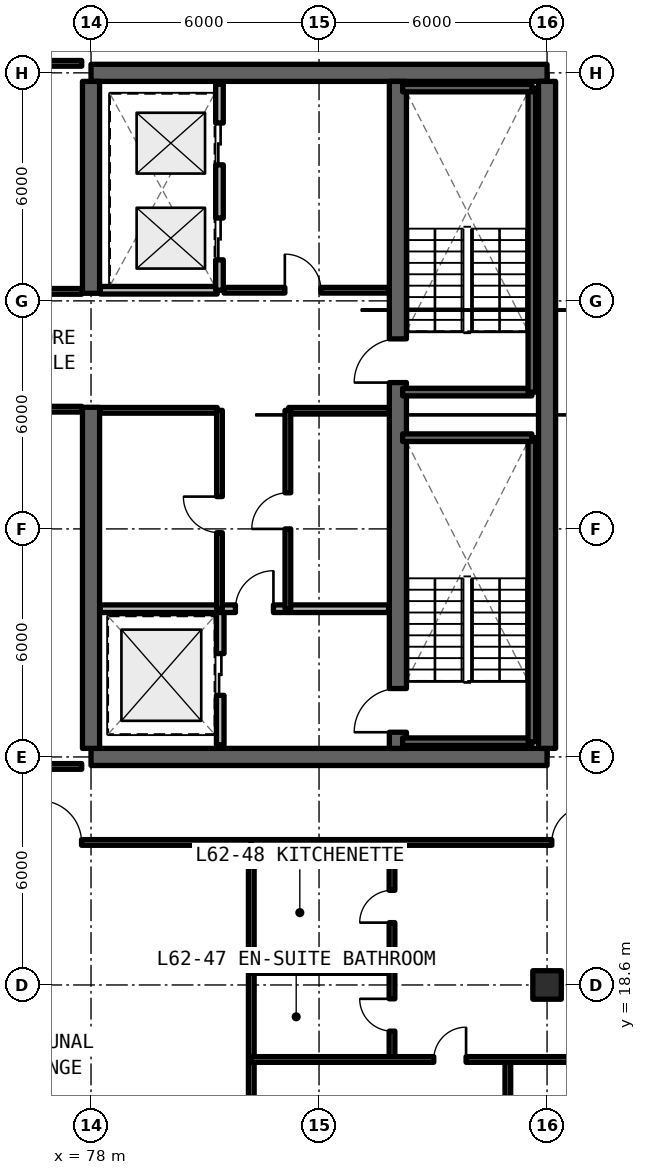
"""IFC4 building model, lengths in metres.
Left out: names, types, materials, properties, quantities, classifications, styles, units other than length and angle.
Written with IfcOpenShell. Run it as: python <this file> out.ifc"""

import sys

from ifc_helpers import new_model, si_unit, direction, frame, frame_2d, origin, origin_2d, place, context, subcontext, project, spatial, rectangle, extrude, element, fill, save


model = new_model("IFC4")
c1 = context("Model", 3, precision=1e-05, world=origin(), true_north=direction((0.0, 1.0)))
c2 = subcontext(c1, "Body", "Model", "MODEL_VIEW")
j1 = project(units=[si_unit("LENGTHUNIT", "METRE"), si_unit("PLANEANGLEUNIT", "RADIAN")], contexts=[c1])
p1 = place(None, origin())
s1 = spatial("IfcSite", under=j1, at=p1, CompositionType="ELEMENT")
p2 = place(p1, origin())
s2 = spatial("IfcBuilding", under=s1, at=p2, CompositionType="ELEMENT")
p3 = place(p2, frame((0.0, 0.0, 222.75)))
s3 = spatial("IfcBuildingStorey", under=s2, at=p3, CompositionType="ELEMENT", Elevation=222.75)
for number, where, z_axis, x_axis in (
    (1, (78.0, 24.6, 0.0), (0.0, 0.0, 1.0), (1.0, 0.0, 0.0)),
    (2, (90.0, 42.6, 0.0), (0.0, 0.0, 1.0), (-1.0, 0.0, 0.0)),
):
    element("IfcWall", number, at=place(p3, frame(where, z_axis=z_axis, x_axis=x_axis)), inside=s3, PredefinedType="SHEAR", context=c2, shape_type="SweptSolid", body=[
        extrude(rectangle(XDim=12.0, YDim=0.45, at=frame_2d((6.0, 0.0))), origin(), (0.0, 0.0, 1.0), 3.3),
    ])
p4 = place(p3, frame((90.0, 24.825, 0.0), z_axis=(0.0, 0.0, 1.0), x_axis=(0.0, 1.0, 0.0)))
e3 = element("IfcWall", 3, at=p4, inside=s3, PredefinedType="SHEAR", context=c2, shape_type="SweptSolid", body=[
    extrude(rectangle(XDim=17.55, YDim=0.45, at=frame_2d((8.775, 0.0))), origin(), (0.0, 0.0, 1.0), 3.3),
])
p5 = place(p3, frame((78.0, 24.825, 0.0), z_axis=(0.0, 0.0, 1.0), x_axis=(0.0, 1.0, 0.0)))
e4 = element("IfcWall", 4, at=p5, inside=s3, PredefinedType="SHEAR", context=c2, shape_type="SweptSolid", body=[
    extrude(rectangle(XDim=8.975, YDim=0.45, at=frame_2d((4.488, 0.0))), origin(), (0.0, 0.0, 1.0), 3.3),
])
p6 = place(p3, frame((78.0, 36.8, 0.0), z_axis=(0.0, 0.0, 1.0), x_axis=(0.0, 1.0, 0.0)))
e5 = element("IfcWall", 5, at=p6, inside=s3, PredefinedType="SHEAR", context=c2, shape_type="SweptSolid", body=[
    extrude(rectangle(XDim=5.575, YDim=0.45, at=frame_2d((2.788, 0.0))), origin(), (0.0, 0.0, 1.0), 3.3),
])
p7 = place(p3, frame((86.075, 24.825, 0.0), z_axis=(0.0, 0.0, 1.0), x_axis=(0.0, 1.0, 0.0)))
e6 = element("IfcWall", 6, at=p7, inside=s3, PredefinedType="SHEAR", context=c2, shape_type="SweptSolid", body=[
    extrude(rectangle(XDim=17.55, YDim=0.45, at=frame_2d((8.775, 0.0))), origin(), (0.0, 0.0, 1.0), 3.3),
])
p8 = place(p7, frame((0.425, 0.0, 0.0)))
e7 = element("IfcOpeningElement", 7, at=p8, cuts=e6, PredefinedType="OPENING", context=c2, shape_type="SweptSolid", body=[
    extrude(rectangle(XDim=1.15, YDim=2.15, at=frame_2d((0.575, 1.075))), frame((0.0, 0.235, 0.0), z_axis=(0.0, -1.0, 0.0), x_axis=(1.0, 0.0, 0.0)), (0.0, 0.0, 1.0), 0.47),
])
p9 = place(p7, frame((9.625, 0.0, 0.0)))
e8 = element("IfcOpeningElement", 8, at=p9, cuts=e6, PredefinedType="OPENING", context=c2, shape_type="SweptSolid", body=[
    extrude(rectangle(XDim=1.15, YDim=2.15, at=frame_2d((0.575, 1.075))), frame((0.0, 0.235, 0.0), z_axis=(0.0, -1.0, 0.0), x_axis=(1.0, 0.0, 0.0)), (0.0, 0.0, 1.0), 0.47),
])
p10 = place(p3, frame((90.0, 18.6, 0.0), z_axis=(0.0, 0.0, 1.0), x_axis=(1.0, 0.0, 0.0)))
e9 = element("IfcColumn", 9, at=p10, inside=s3, PredefinedType="COLUMN", context=c2, shape_type="SweptSolid", body=[
    extrude(rectangle(XDim=0.75, YDim=0.75, at=origin_2d()), origin(), (0.0, 0.0, 1.0), 3.3),
])
p11 = place(p3, frame((81.4, 24.92, 0.0), z_axis=(0.0, 0.0, 1.0), x_axis=(0.0, 1.0, 0.0)))
e10 = element("IfcWall", 10, at=p11, inside=s3, PredefinedType="SOLIDWALL", context=c2, shape_type="SweptSolid", body=[
    extrude(rectangle(XDim=3.58, YDim=0.2, at=frame_2d((1.79, 0.0))), origin(), (0.0, 0.0, 1.0), 2.35),
])
p12 = place(p11, frame((1.3, 0.0, 0.0)))
e11 = element("IfcOpeningElement", 11, at=p12, cuts=e10, PredefinedType="OPENING", context=c2, shape_type="SweptSolid", body=[
    extrude(rectangle(XDim=1.1, YDim=2.2, at=frame_2d((0.55, 1.1))), frame((0.0, 0.11, 0.0), z_axis=(0.0, -1.0, 0.0), x_axis=(1.0, 0.0, 0.0)), (0.0, 0.0, 1.0), 0.22),
])
p13 = place(p3, frame((78.245, 28.5, 0.0), z_axis=(0.0, 0.0, 1.0), x_axis=(1.0, 0.0, 0.0)))
e12 = element("IfcWall", 12, at=p13, inside=s3, PredefinedType="SOLIDWALL", context=c2, shape_type="SweptSolid", body=[
    extrude(rectangle(XDim=7.585, YDim=0.2, at=frame_2d((3.792, 0.0))), origin(), (0.0, 0.0, 1.0), 2.35),
])
p14 = place(p13, frame((3.555, 0.0, 0.0)))
e13 = element("IfcOpeningElement", 13, at=p14, cuts=e12, PredefinedType="OPENING", context=c2, shape_type="SweptSolid", body=[
    extrude(rectangle(XDim=1.0, YDim=2.15, at=frame_2d((0.5, 1.075))), frame((0.0, 0.11, 0.0), z_axis=(0.0, -1.0, 0.0), x_axis=(1.0, 0.0, 0.0)), (0.0, 0.0, 1.0), 0.22),
])
p15 = place(p3, frame((83.2, 33.72, 0.0), z_axis=(0.0, 0.0, 1.0), x_axis=(1.0, 0.0, 0.0)))
e14 = element("IfcWall", 14, at=p15, inside=s3, PredefinedType="SOLIDWALL", context=c2, shape_type="SweptSolid", body=[
    extrude(rectangle(XDim=2.63, YDim=0.15, at=frame_2d((1.315, 0.0))), origin(), (0.0, 0.0, 1.0), 2.35),
])
p16 = place(p3, frame((83.18, 28.5, 0.0), z_axis=(0.0, 0.0, 1.0), x_axis=(0.0, 1.0, 0.0)))
e15 = element("IfcWall", 15, at=p16, inside=s3, PredefinedType="SOLIDWALL", context=c2, shape_type="SweptSolid", body=[
    extrude(rectangle(XDim=5.22, YDim=0.15, at=frame_2d((2.61, 0.0))), origin(), (0.0, 0.0, 1.0), 2.35),
])
p17 = place(p16, frame((2.1, 0.0, 0.0)))
e16 = element("IfcOpeningElement", 16, at=p17, cuts=e15, PredefinedType="OPENING", context=c2, shape_type="SweptSolid", body=[
    extrude(rectangle(XDim=0.95, YDim=2.15, at=frame_2d((0.475, 1.075))), frame((0.0, 0.085, 0.0), z_axis=(0.0, -1.0, 0.0), x_axis=(1.0, 0.0, 0.0)), (0.0, 0.0, 1.0), 0.17),
])
p18 = place(p3, frame((78.245, 33.72, 0.0), z_axis=(0.0, 0.0, 1.0), x_axis=(1.0, 0.0, 0.0)))
e17 = element("IfcWall", 17, at=p18, inside=s3, PredefinedType="SOLIDWALL", context=c2, shape_type="SweptSolid", body=[
    extrude(rectangle(XDim=3.075, YDim=0.15, at=frame_2d((1.538, 0.0))), origin(), (0.0, 0.0, 1.0), 2.35),
])
p19 = place(p3, frame((81.38, 28.5, 0.0), z_axis=(0.0, 0.0, 1.0), x_axis=(0.0, 1.0, 0.0)))
e18 = element("IfcWall", 18, at=p19, inside=s3, PredefinedType="SOLIDWALL", context=c2, shape_type="SweptSolid", body=[
    extrude(rectangle(XDim=5.22, YDim=0.15, at=frame_2d((2.61, 0.0))), origin(), (0.0, 0.0, 1.0), 2.35),
])
p20 = place(p19, frame((2.0, 0.0, 0.0)))
e19 = element("IfcOpeningElement", 19, at=p20, cuts=e18, PredefinedType="OPENING", context=c2, shape_type="SweptSolid", body=[
    extrude(rectangle(XDim=0.95, YDim=2.15, at=frame_2d((0.475, 1.075))), frame((0.0, 0.085, 0.0), z_axis=(0.0, -1.0, 0.0), x_axis=(1.0, 0.0, 0.0)), (0.0, 0.0, 1.0), 0.17),
])
p21 = place(p3, frame((81.5, 36.88, 0.0), z_axis=(0.0, 0.0, 1.0), x_axis=(1.0, 0.0, 0.0)))
e20 = element("IfcWall", 20, at=p21, inside=s3, PredefinedType="SOLIDWALL", context=c2, shape_type="SweptSolid", body=[
    extrude(rectangle(XDim=4.33, YDim=0.15, at=frame_2d((2.165, 0.0))), origin(), (0.0, 0.0, 1.0), 2.35),
])
p22 = place(p21, frame((1.6, 0.0, 0.0)))
e21 = element("IfcOpeningElement", 21, at=p22, cuts=e20, PredefinedType="OPENING", context=c2, shape_type="SweptSolid", body=[
    extrude(rectangle(XDim=0.95, YDim=2.15, at=frame_2d((0.475, 1.075))), frame((0.0, 0.085, 0.0), z_axis=(0.0, -1.0, 0.0), x_axis=(1.0, 0.0, 0.0)), (0.0, 0.0, 1.0), 0.17),
])
p23 = place(p3, frame((78.245, 36.88, 0.0), z_axis=(0.0, 0.0, 1.0), x_axis=(1.0, 0.0, 0.0)))
e22 = element("IfcWall", 22, at=p23, inside=s3, PredefinedType="SOLIDWALL", context=c2, shape_type="SweptSolid", body=[
    extrude(rectangle(XDim=3.075, YDim=0.2, at=frame_2d((1.538, 0.0))), origin(), (0.0, 0.0, 1.0), 2.35),
])
p24 = place(p3, frame((81.38, 36.88, 0.0), z_axis=(0.0, 0.0, 1.0), x_axis=(0.0, 1.0, 0.0)))
e23 = element("IfcWall", 23, at=p24, inside=s3, PredefinedType="SOLIDWALL", context=c2, shape_type="SweptSolid", body=[
    extrude(rectangle(XDim=5.42, YDim=0.2, at=frame_2d((2.71, 0.0))), origin(), (0.0, 0.0, 1.0), 2.35),
])
p25 = place(p24, frame((0.8, 0.0, 0.0)))
e24 = element("IfcOpeningElement", 24, at=p25, cuts=e23, PredefinedType="OPENING", context=c2, shape_type="SweptSolid", body=[
    extrude(rectangle(XDim=1.1, YDim=2.2, at=frame_2d((0.55, 1.1))), frame((0.0, 0.11, 0.0), z_axis=(0.0, -1.0, 0.0), x_axis=(1.0, 0.0, 0.0)), (0.0, 0.0, 1.0), 0.22),
])
p26 = place(p24, frame((3.3, 0.0, 0.0)))
e25 = element("IfcOpeningElement", 25, at=p26, cuts=e23, PredefinedType="OPENING", context=c2, shape_type="SweptSolid", body=[
    extrude(rectangle(XDim=1.1, YDim=2.2, at=frame_2d((0.55, 1.1))), frame((0.0, 0.11, 0.0), z_axis=(0.0, -1.0, 0.0), x_axis=(1.0, 0.0, 0.0)), (0.0, 0.0, 1.0), 0.22),
])
p27 = place(p3, frame((69.85, 24.35, 0.0), z_axis=(0.0, 0.0, 1.0), x_axis=(1.0, 0.0, 0.0)))
e26 = element("IfcWall", 26, at=p27, inside=s3, PredefinedType="SOLIDWALL", context=c2, shape_type="SweptSolid", body=[
    extrude(rectangle(XDim=7.905, YDim=0.15, at=frame_2d((3.952, 0.0))), origin(), (0.0, 0.0, 1.0), 2.35),
])
p28 = place(p3, frame((69.85, 33.75, 0.0), z_axis=(0.0, 0.0, 1.0), x_axis=(1.0, 0.0, 0.0)))
e27 = element("IfcWall", 27, at=p28, inside=s3, PredefinedType="SOLIDWALL", context=c2, shape_type="SweptSolid", body=[
    extrude(rectangle(XDim=7.905, YDim=0.15, at=frame_2d((3.952, 0.0))), origin(), (0.0, 0.0, 1.0), 2.35),
])
p29 = place(p28, frame((3.478, 0.0, 0.0)))
e28 = element("IfcOpeningElement", 28, at=p29, cuts=e27, PredefinedType="OPENING", context=c2, shape_type="SweptSolid", body=[
    extrude(rectangle(XDim=0.95, YDim=2.15, at=frame_2d((0.475, 1.075))), frame((0.0, 0.085, 0.0), z_axis=(0.0, -1.0, 0.0), x_axis=(1.0, 0.0, 0.0)), (0.0, 0.0, 1.0), 0.17),
])
p30 = place(p3, frame((69.85, 36.85, 0.0), z_axis=(0.0, 0.0, 1.0), x_axis=(1.0, 0.0, 0.0)))
e29 = element("IfcWall", 29, at=p30, inside=s3, PredefinedType="SOLIDWALL", context=c2, shape_type="SweptSolid", body=[
    extrude(rectangle(XDim=7.905, YDim=0.15, at=frame_2d((3.952, 0.0))), origin(), (0.0, 0.0, 1.0), 2.35),
])
p31 = place(p30, frame((3.478, 0.0, 0.0)))
e30 = element("IfcOpeningElement", 30, at=p31, cuts=e29, PredefinedType="OPENING", context=c2, shape_type="SweptSolid", body=[
    extrude(rectangle(XDim=0.95, YDim=2.15, at=frame_2d((0.475, 1.075))), frame((0.0, 0.085, 0.0), z_axis=(0.0, -1.0, 0.0), x_axis=(1.0, 0.0, 0.0)), (0.0, 0.0, 1.0), 0.17),
])
p32 = place(p3, frame((69.85, 42.85, 0.0), z_axis=(0.0, 0.0, 1.0), x_axis=(1.0, 0.0, 0.0)))
e31 = element("IfcWall", 31, at=p32, inside=s3, PredefinedType="SOLIDWALL", context=c2, shape_type="SweptSolid", body=[
    extrude(rectangle(XDim=7.905, YDim=0.15, at=frame_2d((3.952, 0.0))), origin(), (0.0, 0.0, 1.0), 2.35),
])
p33 = place(p3, frame((82.217, 12.27, 0.0), z_axis=(0.0, 0.0, 1.0), x_axis=(0.0, 1.0, 0.0)))
e32 = element("IfcWall", 32, at=p33, inside=s3, PredefinedType="SOLIDWALL", context=c2, shape_type="SweptSolid", body=[
    extrude(rectangle(XDim=10.08, YDim=0.15, at=frame_2d((5.04, 0.0))), origin(), (0.0, 0.0, 1.0), 2.35),
])
p34 = place(p3, frame((72.185, 22.35, 0.0), z_axis=(0.0, 0.0, 1.0), x_axis=(1.0, 0.0, 0.0)))
e33 = element("IfcWall", 33, at=p34, inside=s3, PredefinedType="SOLIDWALL", context=c2, shape_type="SweptSolid", body=[
    extrude(rectangle(XDim=10.032, YDim=0.15, at=frame_2d((5.016, 0.0))), origin(), (0.0, 0.0, 1.0), 2.35),
])
p35 = place(p34, frame((4.466, 0.0, 0.0)))
e34 = element("IfcOpeningElement", 34, at=p35, cuts=e33, PredefinedType="OPENING", context=c2, shape_type="SweptSolid", body=[
    extrude(rectangle(XDim=1.1, YDim=2.15, at=frame_2d((0.55, 1.075))), frame((0.0, 0.085, 0.0), z_axis=(0.0, -1.0, 0.0), x_axis=(1.0, 0.0, 0.0)), (0.0, 0.0, 1.0), 0.17),
])
p36 = place(p3, frame((82.217, 18.981, 0.0), z_axis=(0.0, 0.0, 1.0), x_axis=(1.0, 0.0, 0.0)))
e35 = element("IfcWall", 35, at=p36, inside=s3, PredefinedType="PARTITIONING", context=c2, shape_type="SweptSolid", body=[
    extrude(rectangle(XDim=3.703, YDim=0.15, at=frame_2d((1.852, 0.0))), origin(), (0.0, 0.0, 1.0), 2.35),
])
p37 = place(p3, frame((85.92, 16.64, 0.0), z_axis=(0.0, 0.0, 1.0), x_axis=(0.0, 1.0, 0.0)))
e36 = element("IfcWall", 36, at=p37, inside=s3, PredefinedType="PARTITIONING", context=c2, shape_type="SweptSolid", body=[
    extrude(rectangle(XDim=5.71, YDim=0.15, at=frame_2d((2.855, 0.0))), origin(), (0.0, 0.0, 1.0), 2.35),
])
p38 = place(p37, frame((0.746, 0.0, 0.0)))
e37 = element("IfcOpeningElement", 37, at=p38, cuts=e36, PredefinedType="OPENING", context=c2, shape_type="SweptSolid", body=[
    extrude(rectangle(XDim=0.85, YDim=2.1, at=frame_2d((0.425, 1.05))), frame((0.0, 0.085, 0.0), z_axis=(0.0, -1.0, 0.0), x_axis=(1.0, 0.0, 0.0)), (0.0, 0.0, 1.0), 0.17),
])
p39 = place(p37, frame((3.601, 0.0, 0.0)))
e38 = element("IfcOpeningElement", 38, at=p39, cuts=e36, PredefinedType="OPENING", context=c2, shape_type="SweptSolid", body=[
    extrude(rectangle(XDim=0.85, YDim=2.1, at=frame_2d((0.425, 1.05))), frame((0.0, 0.085, 0.0), z_axis=(0.0, -1.0, 0.0), x_axis=(1.0, 0.0, 0.0)), (0.0, 0.0, 1.0), 0.17),
])
p40 = place(p3, frame((88.968, 12.27, 0.0), z_axis=(0.0, 0.0, 1.0), x_axis=(0.0, 1.0, 0.0)))
e39 = element("IfcWall", 39, at=p40, inside=s3, PredefinedType="PARTITIONING", context=c2, shape_type="SweptSolid", body=[
    extrude(rectangle(XDim=4.37, YDim=0.15, at=frame_2d((2.185, 0.0))), origin(), (0.0, 0.0, 1.0), 2.35),
])
p41 = place(p3, frame((82.217, 16.64, 0.0), z_axis=(0.0, 0.0, 1.0), x_axis=(1.0, 0.0, 0.0)))
e40 = element("IfcWall", 40, at=p41, inside=s3, PredefinedType="PARTITIONING", context=c2, shape_type="SweptSolid", body=[
    extrude(rectangle(XDim=12.983, YDim=0.15, at=frame_2d((6.492, 0.0))), origin(), (0.0, 0.0, 1.0), 2.35),
])
p42 = place(p41, frame((4.802, 0.0, 0.0)))
e41 = element("IfcOpeningElement", 41, at=p42, cuts=e40, PredefinedType="OPENING", context=c2, shape_type="SweptSolid", body=[
    extrude(rectangle(XDim=0.85, YDim=2.1, at=frame_2d((0.425, 1.05))), frame((0.0, 0.085, 0.0), z_axis=(0.0, -1.0, 0.0), x_axis=(1.0, 0.0, 0.0)), (0.0, 0.0, 1.0), 0.17),
])
p43 = place(p41, frame((9.442, 0.0, 0.0)))
e42 = element("IfcOpeningElement", 42, at=p43, cuts=e40, PredefinedType="OPENING", context=c2, shape_type="SweptSolid", body=[
    extrude(rectangle(XDim=0.85, YDim=2.1, at=frame_2d((0.425, 1.05))), frame((0.0, 0.085, 0.0), z_axis=(0.0, -1.0, 0.0), x_axis=(1.0, 0.0, 0.0)), (0.0, 0.0, 1.0), 0.17),
])
p44 = place(p3, frame((82.217, 22.35, 0.0), z_axis=(0.0, 0.0, 1.0), x_axis=(1.0, 0.0, 0.0)))
e43 = element("IfcWall", 43, at=p44, inside=s3, PredefinedType="SOLIDWALL", context=c2, shape_type="SweptSolid", body=[
    extrude(rectangle(XDim=12.983, YDim=0.15, at=frame_2d((6.492, 0.0))), origin(), (0.0, 0.0, 1.0), 2.35),
])
p45 = place(p44, frame((7.908, 0.0, 0.0)))
e44 = element("IfcOpeningElement", 44, at=p45, cuts=e43, PredefinedType="OPENING", context=c2, shape_type="SweptSolid", body=[
    extrude(rectangle(XDim=0.95, YDim=2.15, at=frame_2d((0.475, 1.075))), frame((0.0, 0.085, 0.0), z_axis=(0.0, -1.0, 0.0), x_axis=(1.0, 0.0, 0.0)), (0.0, 0.0, 1.0), 0.17),
])
p46 = place(p3, frame((86.2, 25.0, 0.0), z_axis=(0.0, 0.0, 1.0), x_axis=(1.0, 0.0, 0.0)))
e45 = element("IfcWall", 45, at=p46, inside=s3, PredefinedType="SOLIDWALL", context=c2, shape_type="SweptSolid", body=[
    extrude(rectangle(XDim=3.4, YDim=0.2, at=frame_2d((1.7, 0.0))), origin(), (0.0, 0.0, 1.0), 3.3),
])
p47 = place(p3, frame((89.6, 25.0, 0.0), z_axis=(0.0, 0.0, 1.0), x_axis=(0.0, 1.0, 0.0)))
e46 = element("IfcWall", 46, at=p47, inside=s3, PredefinedType="SOLIDWALL", context=c2, shape_type="SweptSolid", body=[
    extrude(rectangle(XDim=8.0, YDim=0.2, at=frame_2d((4.0, 0.0))), origin(), (0.0, 0.0, 1.0), 3.3),
])
for number, where, z_axis, x_axis in (
    (47, (89.6, 33.0, 0.0), (0.0, 0.0, 1.0), (-1.0, 0.0, 0.0)),
    (48, (86.2, 34.2, 0.0), (0.0, 0.0, 1.0), (1.0, 0.0, 0.0)),
):
    element("IfcWall", number, at=place(p3, frame(where, z_axis=z_axis, x_axis=x_axis)), inside=s3, PredefinedType="SOLIDWALL", context=c2, shape_type="SweptSolid", body=[
        extrude(rectangle(XDim=3.4, YDim=0.2, at=frame_2d((1.7, 0.0))), origin(), (0.0, 0.0, 1.0), 3.3),
    ])
p48 = place(p3, frame((89.6, 34.2, 0.0), z_axis=(0.0, 0.0, 1.0), x_axis=(0.0, 1.0, 0.0)))
e49 = element("IfcWall", 49, at=p48, inside=s3, PredefinedType="SOLIDWALL", context=c2, shape_type="SweptSolid", body=[
    extrude(rectangle(XDim=8.0, YDim=0.2, at=frame_2d((4.0, 0.0))), origin(), (0.0, 0.0, 1.0), 3.3),
])
p49 = place(p3, frame((89.6, 42.2, 0.0), z_axis=(0.0, 0.0, 1.0), x_axis=(-1.0, 0.0, 0.0)))
e50 = element("IfcWall", 50, at=p49, inside=s3, PredefinedType="SOLIDWALL", context=c2, shape_type="SweptSolid", body=[
    extrude(rectangle(XDim=3.4, YDim=0.2, at=frame_2d((1.7, 0.0))), origin(), (0.0, 0.0, 1.0), 3.3),
])
p50 = place(p12, origin())
e51 = element("IfcDoor", 51, at=p50, inside=s3, OperationType="SLIDING_TO_LEFT", PredefinedType="DOOR", context=c2, shape_type="SweptSolid", body=[
    extrude(rectangle(XDim=1.1, YDim=2.2, at=frame_2d((0.55, 1.1))), frame((0.0, 0.025, 0.0), z_axis=(0.0, -1.0, 0.0), x_axis=(1.0, 0.0, 0.0)), (0.0, 0.0, 1.0), 0.05),
])
fill(e11, e51)
p51 = place(p14, origin())
e52 = element("IfcDoor", 52, at=p51, inside=s3, OperationType="SINGLE_SWING_RIGHT", PredefinedType="DOOR", context=c2, shape_type="SweptSolid", body=[
    extrude(rectangle(XDim=1.0, YDim=2.15, at=frame_2d((0.5, 1.075))), frame((0.0, 0.025, 0.0), z_axis=(0.0, -1.0, 0.0), x_axis=(1.0, 0.0, 0.0)), (0.0, 0.0, 1.0), 0.05),
])
fill(e13, e52)
p52 = place(p17, origin())
e53 = element("IfcDoor", 53, at=p52, inside=s3, OperationType="SINGLE_SWING_LEFT", PredefinedType="DOOR", context=c2, shape_type="SweptSolid", body=[
    extrude(rectangle(XDim=0.95, YDim=2.15, at=frame_2d((0.475, 1.075))), frame((0.0, 0.025, 0.0), z_axis=(0.0, -1.0, 0.0), x_axis=(1.0, 0.0, 0.0)), (0.0, 0.0, 1.0), 0.05),
])
fill(e16, e53)
p53 = place(p20, origin())
e54 = element("IfcDoor", 54, at=p53, inside=s3, OperationType="SINGLE_SWING_RIGHT", PredefinedType="DOOR", context=c2, shape_type="SweptSolid", body=[
    extrude(rectangle(XDim=0.95, YDim=2.15, at=frame_2d((0.475, 1.075))), frame((0.0, 0.025, 0.0), z_axis=(0.0, -1.0, 0.0), x_axis=(1.0, 0.0, 0.0)), (0.0, 0.0, 1.0), 0.05),
])
fill(e19, e54)
p54 = place(p22, origin())
e55 = element("IfcDoor", 55, at=p54, inside=s3, OperationType="SINGLE_SWING_LEFT", PredefinedType="DOOR", context=c2, shape_type="SweptSolid", body=[
    extrude(rectangle(XDim=0.95, YDim=2.15, at=frame_2d((0.475, 1.075))), frame((0.0, 0.025, 0.0), z_axis=(0.0, -1.0, 0.0), x_axis=(1.0, 0.0, 0.0)), (0.0, 0.0, 1.0), 0.05),
])
fill(e21, e55)
p55 = place(p25, origin())
e56 = element("IfcDoor", 56, at=p55, inside=s3, OperationType="SLIDING_TO_LEFT", PredefinedType="DOOR", context=c2, shape_type="SweptSolid", body=[
    extrude(rectangle(XDim=1.1, YDim=2.2, at=frame_2d((0.55, 1.1))), frame((0.0, 0.025, 0.0), z_axis=(0.0, -1.0, 0.0), x_axis=(1.0, 0.0, 0.0)), (0.0, 0.0, 1.0), 0.05),
])
fill(e24, e56)
p56 = place(p26, origin())
e57 = element("IfcDoor", 57, at=p56, inside=s3, OperationType="SLIDING_TO_RIGHT", PredefinedType="DOOR", context=c2, shape_type="SweptSolid", body=[
    extrude(rectangle(XDim=1.1, YDim=2.2, at=frame_2d((0.55, 1.1))), frame((0.0, 0.025, 0.0), z_axis=(0.0, -1.0, 0.0), x_axis=(1.0, 0.0, 0.0)), (0.0, 0.0, 1.0), 0.05),
])
fill(e25, e57)
p57 = place(p35, origin())
e58 = element("IfcDoor", 58, at=p57, inside=s3, OperationType="SINGLE_SWING_LEFT", PredefinedType="DOOR", context=c2, shape_type="SweptSolid", body=[
    extrude(rectangle(XDim=1.1, YDim=2.15, at=frame_2d((0.55, 1.075))), frame((0.0, 0.025, 0.0), z_axis=(0.0, -1.0, 0.0), x_axis=(1.0, 0.0, 0.0)), (0.0, 0.0, 1.0), 0.05),
])
fill(e34, e58)
p58 = place(p38, origin())
e59 = element("IfcDoor", 59, at=p58, inside=s3, OperationType="SINGLE_SWING_RIGHT", PredefinedType="DOOR", context=c2, shape_type="SweptSolid", body=[
    extrude(rectangle(XDim=0.85, YDim=2.1, at=frame_2d((0.425, 1.05))), frame((0.0, 0.025, 0.0), z_axis=(0.0, -1.0, 0.0), x_axis=(1.0, 0.0, 0.0)), (0.0, 0.0, 1.0), 0.05),
])
fill(e37, e59)
p59 = place(p39, origin())
e60 = element("IfcDoor", 60, at=p59, inside=s3, OperationType="SINGLE_SWING_LEFT", PredefinedType="DOOR", context=c2, shape_type="SweptSolid", body=[
    extrude(rectangle(XDim=0.85, YDim=2.1, at=frame_2d((0.425, 1.05))), frame((0.0, 0.025, 0.0), z_axis=(0.0, -1.0, 0.0), x_axis=(1.0, 0.0, 0.0)), (0.0, 0.0, 1.0), 0.05),
])
fill(e38, e60)
p60 = place(p42, origin())
e61 = element("IfcDoor", 61, at=p60, inside=s3, OperationType="SINGLE_SWING_RIGHT", PredefinedType="DOOR", context=c2, shape_type="SweptSolid", body=[
    extrude(rectangle(XDim=0.85, YDim=2.1, at=frame_2d((0.425, 1.05))), frame((0.0, 0.025, 0.0), z_axis=(0.0, -1.0, 0.0), x_axis=(1.0, 0.0, 0.0)), (0.0, 0.0, 1.0), 0.05),
])
fill(e41, e61)
p61 = place(p45, origin())
e62 = element("IfcDoor", 62, at=p61, inside=s3, OperationType="SINGLE_SWING_RIGHT", PredefinedType="DOOR", context=c2, shape_type="SweptSolid", body=[
    extrude(rectangle(XDim=0.95, YDim=2.15, at=frame_2d((0.475, 1.075))), frame((0.0, 0.025, 0.0), z_axis=(0.0, -1.0, 0.0), x_axis=(1.0, 0.0, 0.0)), (0.0, 0.0, 1.0), 0.05),
])
fill(e44, e62)
p62 = place(p8, origin())
e63 = element("IfcDoor", 63, at=p62, inside=s3, OperationType="SINGLE_SWING_RIGHT", PredefinedType="DOOR", context=c2, shape_type="SweptSolid", body=[
    extrude(rectangle(XDim=1.15, YDim=2.15, at=frame_2d((0.575, 1.075))), frame((0.0, 0.025, 0.0), z_axis=(0.0, -1.0, 0.0), x_axis=(1.0, 0.0, 0.0)), (0.0, 0.0, 1.0), 0.05),
])
fill(e7, e63)
p63 = place(p9, origin())
e64 = element("IfcDoor", 64, at=p63, inside=s3, OperationType="SINGLE_SWING_LEFT", PredefinedType="DOOR", context=c2, shape_type="SweptSolid", body=[
    extrude(rectangle(XDim=1.15, YDim=2.15, at=frame_2d((0.575, 1.075))), frame((0.0, 0.025, 0.0), z_axis=(0.0, -1.0, 0.0), x_axis=(1.0, 0.0, 0.0)), (0.0, 0.0, 1.0), 0.05),
])
fill(e8, e64)
save(model, sys.argv[1])
